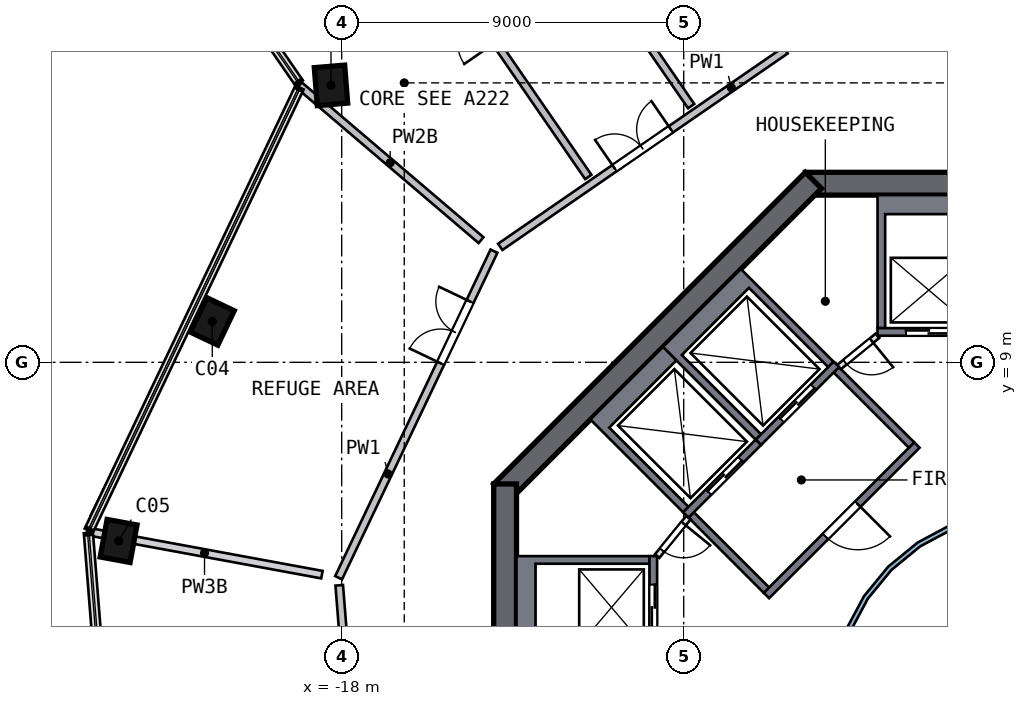
"""IFC4 building model, lengths in metres.
Left out: names, types, materials, properties, quantities, classifications, styles, units other than length and angle.
Written with IfcOpenShell. Run it as: python <this file> out.ifc"""

import sys

from ifc_helpers import new_model, si_unit, direction, frame, frame_2d, origin, origin_2d, place, context, subcontext, project, spatial, polyline, rectangle, outline, extrude, element, fill, save


model = new_model("IFC4")
c1 = context("Model", 3, precision=1e-05, world=origin(), true_north=direction((0.0, 1.0)))
c2 = subcontext(c1, "Body", "Model", "MODEL_VIEW")
j1 = project(units=[si_unit("LENGTHUNIT", "METRE"), si_unit("PLANEANGLEUNIT", "RADIAN")], contexts=[c1])
p1 = place(None, origin())
s1 = spatial("IfcSite", under=j1, at=p1, CompositionType="ELEMENT")
p2 = place(p1, origin())
s2 = spatial("IfcBuilding", under=s1, at=p2, CompositionType="ELEMENT")
p3 = place(p2, frame((0.0, 0.0, 175.0)))
s3 = spatial("IfcBuildingStorey", under=s2, at=p3, CompositionType="ELEMENT", Elevation=175.0)
p4 = place(p3, frame((-18.216, 16.362, 0.0), z_axis=(-0.054164651, -0.061272464, 0.996650328), x_axis=(-0.082257705, 0.994996853, 0.056700377)))
e1 = element("IfcColumn", 1, at=p4, inside=s3, PredefinedType="COLUMN", context=c2, shape_type="SweptSolid", body=[
    extrude(rectangle(XDim=1.0, YDim=0.8, at=origin_2d()), origin(), (0.0, 0.0, 1.0), 4.706),
])
p5 = place(p3, frame((-21.364, 10.163, 0.0), z_axis=(-0.033367399, -0.071664662, 0.9968705), x_axis=(-0.428377245, -0.90013564, -0.079049135)))
e2 = element("IfcColumn", 2, at=p5, inside=s3, PredefinedType="COLUMN", context=c2, shape_type="SweptSolid", body=[
    extrude(rectangle(XDim=1.0, YDim=0.8, at=origin_2d()), origin(), (0.0, 0.0, 1.0), 4.705),
])
p6 = place(p3, frame((-23.853, 4.395, 0.0), z_axis=(-0.014009031, -0.079747708, 0.996716635), x_axis=(0.180722075, 0.980195922, 0.08096596)))
e3 = element("IfcColumn", 3, at=p6, inside=s3, PredefinedType="COLUMN", context=c2, shape_type="SweptSolid", body=[
    extrude(rectangle(XDim=1.0, YDim=0.8, at=origin_2d()), origin(), (0.0, 0.0, 1.0), 4.705),
])
p7 = place(p3, frame((5.799, 13.7, 0.0), z_axis=(0.0, 0.0, 1.0), x_axis=(-1.0, 0.0, 0.0)))
e4 = element("IfcWall", 4, at=p7, inside=s3, PredefinedType="SHEAR", context=c2, shape_type="SweptSolid", body=[
    extrude(rectangle(XDim=11.598, YDim=0.6, at=frame_2d((5.799, 0.0))), origin(), (0.0, 0.0, 1.0), 5.0),
])
p8 = place(p7, frame((4.899, 0.0, 0.0)))
e5 = element("IfcOpeningElement", 5, at=p8, cuts=e4, PredefinedType="OPENING", context=c2, shape_type="SweptSolid", body=[
    extrude(rectangle(XDim=1.8, YDim=2.1, at=frame_2d((0.9, 1.05))), frame((0.0, 0.31, 0.0), z_axis=(0.0, -1.0, 0.0), x_axis=(1.0, 0.0, 0.0)), (0.0, 0.0, 1.0), 0.62),
])
p9 = place(p3, frame((-5.587, 13.788, 0.0), z_axis=(0.0, 0.0, 1.0), x_axis=(-0.707106781, -0.707106781, 0.0)))
e6 = element("IfcWall", 6, at=p9, inside=s3, PredefinedType="SHEAR", context=c2, shape_type="SweptSolid", body=[
    extrude(rectangle(XDim=11.598, YDim=0.6, at=frame_2d((5.799, 0.0))), origin(), (0.0, 0.0, 1.0), 5.0),
])
p10 = place(p3, frame((-13.7, 5.799, 0.0), z_axis=(0.0, 0.0, 1.0), x_axis=(0.0, -1.0, 0.0)))
e7 = element("IfcWall", 7, at=p10, inside=s3, PredefinedType="SHEAR", context=c2, shape_type="SweptSolid", body=[
    extrude(rectangle(XDim=11.598, YDim=0.6, at=frame_2d((5.799, 0.0))), origin(), (0.0, 0.0, 1.0), 5.0),
])
p11 = place(p10, frame((4.899, 0.0, 0.0)))
e8 = element("IfcOpeningElement", 8, at=p11, cuts=e7, PredefinedType="OPENING", context=c2, shape_type="SweptSolid", body=[
    extrude(rectangle(XDim=1.8, YDim=2.1, at=frame_2d((0.9, 1.05))), frame((0.0, 0.31, 0.0), z_axis=(0.0, -1.0, 0.0), x_axis=(1.0, 0.0, 0.0)), (0.0, 0.0, 1.0), 0.62),
])
p12 = place(p3, origin())
e9 = element("IfcWall", 9, at=p12, inside=s3, PredefinedType="SOLIDWALL", context=c2, shape_type="SweptSolid", body=[
    extrude(outline(polyline([(-3.9, 13.4), (-1.2, 13.4), (-1.2, 9.9), (-1.4, 9.9), (-1.4, 12.9), (-3.7, 12.9), (-3.7, 9.9), (-3.9, 9.9), (-3.9, 13.4)])), origin(), (0.0, 0.0, 1.0), 4.69),
])
p13 = place(p3, frame((-1.2, 9.8, 0.0), z_axis=(0.0, 0.0, 1.0), x_axis=(-1.0, 0.0, 0.0)))
e10 = element("IfcWall", 10, at=p13, inside=s3, PredefinedType="SOLIDWALL", context=c2, shape_type="SweptSolid", body=[
    extrude(rectangle(XDim=2.7, YDim=0.2, at=frame_2d((1.35, 0.0))), origin(), (0.0, 0.0, 1.0), 4.69),
])
p14 = place(p13, frame((0.75, 0.0, 0.0)))
e11 = element("IfcOpeningElement", 11, at=p14, cuts=e10, PredefinedType="OPENING", context=c2, shape_type="SweptSolid", body=[
    extrude(rectangle(XDim=1.2, YDim=2.1, at=frame_2d((0.6, 1.05))), frame((0.0, 0.11, 0.0), z_axis=(0.0, -1.0, 0.0), x_axis=(1.0, 0.0, 0.0)), (0.0, 0.0, 1.0), 0.22),
])
p15 = place(p3, origin())
e12 = element("IfcWall", 12, at=p15, inside=s3, PredefinedType="SOLIDWALL", context=c2, shape_type="SweptSolid", body=[
    extrude(outline(polyline([(-13.4, 3.9), (-9.9, 3.9), (-9.9, 3.7), (-12.9, 3.7), (-12.9, 1.4), (-9.9, 1.4), (-9.9, 1.2), (-13.4, 1.2), (-13.4, 3.9)])), origin(), (0.0, 0.0, 1.0), 4.69),
])
p16 = place(p3, frame((-9.8, 1.2, 0.0), z_axis=(0.0, 0.0, 1.0), x_axis=(0.0, 1.0, 0.0)))
e13 = element("IfcWall", 13, at=p16, inside=s3, PredefinedType="SOLIDWALL", context=c2, shape_type="SweptSolid", body=[
    extrude(rectangle(XDim=2.7, YDim=0.2, at=frame_2d((1.35, 0.0))), origin(), (0.0, 0.0, 1.0), 4.69),
])
p17 = place(p16, frame((0.75, 0.0, 0.0)))
e14 = element("IfcOpeningElement", 14, at=p17, cuts=e13, PredefinedType="OPENING", context=c2, shape_type="SweptSolid", body=[
    extrude(rectangle(XDim=1.2, YDim=2.1, at=frame_2d((0.6, 1.05))), frame((0.0, 0.11, 0.0), z_axis=(0.0, -1.0, 0.0), x_axis=(1.0, 0.0, 0.0)), (0.0, 0.0, 1.0), 0.22),
])
p18 = place(p3, origin())
e15 = element("IfcWall", 15, at=p18, inside=s3, PredefinedType="SOLIDWALL", context=c2, shape_type="SweptSolid", body=[
    extrude(outline(polyline([(-9.546, 9.405), (-7.495, 11.455), (-5.056, 9.016), (-5.197, 8.874), (-7.283, 10.96), (-9.051, 9.192), (-6.965, 7.106), (-7.106, 6.965), (-9.546, 9.405)])), origin(), (0.0, 0.0, 1.0), 4.69),
])
p19 = place(p3, frame((-4.985, 8.945, 0.0), z_axis=(0.0, 0.0, 1.0), x_axis=(-0.707106781, -0.707106781, 0.0)))
e16 = element("IfcWall", 16, at=p19, inside=s3, PredefinedType="SOLIDWALL", context=c2, shape_type="SweptSolid", body=[
    extrude(rectangle(XDim=2.9, YDim=0.2, at=frame_2d((1.45, 0.0))), origin(), (0.0, 0.0, 1.0), 4.69),
])
p20 = place(p19, frame((0.85, 0.0, 0.0)))
e17 = element("IfcOpeningElement", 17, at=p20, cuts=e16, PredefinedType="OPENING", context=c2, shape_type="SweptSolid", body=[
    extrude(rectangle(XDim=1.2, YDim=2.1, at=frame_2d((0.6, 1.05))), frame((0.0, 0.11, 0.0), z_axis=(0.0, -1.0, 0.0), x_axis=(1.0, 0.0, 0.0)), (0.0, 0.0, 1.0), 0.22),
])
p21 = place(p3, origin())
e18 = element("IfcWall", 18, at=p21, inside=s3, PredefinedType="SOLIDWALL", context=c2, shape_type="SweptSolid", body=[
    extrude(outline(polyline([(-11.455, 7.495), (-9.546, 9.405), (-9.192, 9.051), (-10.96, 7.283), (-8.874, 5.197), (-9.016, 5.056), (-11.455, 7.495)])), origin(), (0.0, 0.0, 1.0), 4.69),
])
p22 = place(p3, frame((-7.036, 6.894, 0.0), z_axis=(0.0, 0.0, 1.0), x_axis=(-0.707106781, -0.707106781, 0.0)))
e19 = element("IfcWall", 19, at=p22, inside=s3, PredefinedType="SOLIDWALL", context=c2, shape_type="SweptSolid", body=[
    extrude(rectangle(XDim=2.7, YDim=0.2, at=frame_2d((1.35, 0.0))), origin(), (0.0, 0.0, 1.0), 4.69),
])
p23 = place(p22, frame((0.65, 0.0, 0.0)))
e20 = element("IfcOpeningElement", 20, at=p23, cuts=e19, PredefinedType="OPENING", context=c2, shape_type="SweptSolid", body=[
    extrude(rectangle(XDim=1.2, YDim=2.1, at=frame_2d((0.6, 1.05))), frame((0.0, 0.11, 0.0), z_axis=(0.0, -1.0, 0.0), x_axis=(1.0, 0.0, 0.0)), (0.0, 0.0, 1.0), 0.22),
])
p24 = place(p3, frame((-2.864, 6.823, 0.0), z_axis=(0.0, 0.0, 1.0), x_axis=(-0.707106781, -0.707106781, 0.0)))
e21 = element("IfcWall", 21, at=p24, inside=s3, PredefinedType="SOLIDWALL", context=c2, shape_type="SweptSolid", body=[
    extrude(rectangle(XDim=5.6, YDim=0.2, at=frame_2d((2.8, 0.0))), origin(), (0.0, 0.0, 1.0), 4.69),
])
p25 = place(p24, frame((2.2, 0.0, 0.0)))
e22 = element("IfcOpeningElement", 22, at=p25, cuts=e21, PredefinedType="OPENING", context=c2, shape_type="SweptSolid", body=[
    extrude(rectangle(XDim=1.2, YDim=2.1, at=frame_2d((0.6, 1.05))), frame((0.0, 0.11, 0.0), z_axis=(0.0, -1.0, 0.0), x_axis=(1.0, 0.0, 0.0)), (0.0, 0.0, 1.0), 0.22),
])
for number, where, z_axis, x_axis in (
    (23, (-3.005, 6.823, 0.0), (0.0, 0.0, 1.0), (-0.707, 0.707, 0.0)),
    (24, (-6.823, 3.005, 0.0), (0.0, 0.0, 1.0), (-0.707, 0.707, 0.0)),
):
    element("IfcWall", number, at=place(p3, frame(where, z_axis=z_axis, x_axis=x_axis)), inside=s3, PredefinedType="SOLIDWALL", context=c2, shape_type="SweptSolid", body=[
        extrude(rectangle(XDim=2.8, YDim=0.2, at=frame_2d((1.4, 0.0))), origin(), (0.0, 0.0, 1.0), 4.69),
    ])
p26 = place(p3, frame((-3.9, 9.7, 0.0), z_axis=(0.0, 0.0, 1.0), x_axis=(-0.775559878, -0.631274009, 0.0)))
e25 = element("IfcWall", 25, at=p26, inside=s3, PredefinedType="PARTITIONING", context=c2, shape_type="SweptSolid", body=[
    extrude(rectangle(XDim=1.308, YDim=0.15, at=frame_2d((0.654, 0.0))), origin(), (0.0, 0.0, 1.0), 4.69),
])
p27 = place(p26, frame((0.204, 0.0, 0.0)))
e26 = element("IfcOpeningElement", 26, at=p27, cuts=e25, PredefinedType="OPENING", context=c2, shape_type="SweptSolid", body=[
    extrude(rectangle(XDim=0.9, YDim=2.1, at=frame_2d((0.45, 1.05))), frame((0.0, 0.085, 0.0), z_axis=(0.0, -1.0, 0.0), x_axis=(1.0, 0.0, 0.0)), (0.0, 0.0, 1.0), 0.17),
])
p28 = place(p3, frame((-8.874, 4.914, 0.0), z_axis=(0.0, 0.0, 1.0), x_axis=(-0.631274009, -0.775559878, 0.0)))
e27 = element("IfcWall", 27, at=p28, inside=s3, PredefinedType="PARTITIONING", context=c2, shape_type="SweptSolid", body=[
    extrude(rectangle(XDim=1.308, YDim=0.15, at=frame_2d((0.654, 0.0))), origin(), (0.0, 0.0, 1.0), 4.69),
])
p29 = place(p28, frame((0.204, 0.0, 0.0)))
e28 = element("IfcOpeningElement", 28, at=p29, cuts=e27, PredefinedType="OPENING", context=c2, shape_type="SweptSolid", body=[
    extrude(rectangle(XDim=0.9, YDim=2.1, at=frame_2d((0.45, 1.05))), frame((0.0, 0.085, 0.0), z_axis=(0.0, -1.0, 0.0), x_axis=(1.0, 0.0, 0.0)), (0.0, 0.0, 1.0), 0.17),
])
p30 = place(p3, origin())
e29 = element("IfcWall", 29, at=p30, inside=s3, PredefinedType="SOLIDWALL", context=c2, shape_type="SweptSolid", body=[
    extrude(outline(polyline([(5.021, -0.999), (4.73, -1.959), (4.257, -2.844), (3.62, -3.62), (2.844, -4.257), (1.959, -4.73), (0.999, -5.021), (0.0, -5.12), (-0.999, -5.021), (-1.959, -4.73), (-2.844, -4.257), (-3.62, -3.62), (-4.257, -2.844), (-4.73, -1.959), (-5.021, -0.999), (-5.12, 0.0), (-5.021, 0.999), (-4.73, 1.959), (-4.257, 2.844), (-3.62, 3.62), (-2.844, 4.257), (-1.959, 4.73), (-0.999, 5.021), (0.0, 5.12), (0.999, 5.021), (1.959, 4.73), (2.844, 4.257), (3.62, 3.62), (4.257, 2.844), (4.73, 1.959), (5.021, 0.999), (5.12, 0.0), (5.021, -0.999)]), holes=[polyline([(4.904, 0.976), (4.619, 1.913), (4.157, 2.778), (3.535, 3.535), (2.778, 4.157), (1.913, 4.619), (0.976, 4.904), (0.0, 5.0), (-0.976, 4.904), (-1.913, 4.619), (-2.778, 4.157), (-3.535, 3.535), (-4.157, 2.778), (-4.619, 1.913), (-4.904, 0.976), (-5.0, 0.0), (-4.904, -0.976), (-4.619, -1.913), (-4.157, -2.778), (-3.535, -3.535), (-2.778, -4.157), (-1.913, -4.619), (-0.976, -4.904), (0.0, -5.0), (0.976, -4.904), (1.913, -4.619), (2.778, -4.157), (3.535, -3.535), (4.157, -2.778), (4.619, -1.913), (4.904, -0.976), (5.0, 0.0), (4.904, 0.976)])]), origin(), (0.0, 0.0, 1.0), 4.69),
])
p31 = place(p3, frame((-17.34, -5.956, 0.0), z_axis=(0.0, 0.0, 1.0), x_axis=(-0.079507867, 0.996834238, 0.0)))
e30 = element("IfcWall", 30, at=p31, inside=s3, PredefinedType="SOLIDWALL", context=c2, shape_type="SweptSolid", body=[
    extrude(rectangle(XDim=9.117, YDim=0.2, at=frame_2d((4.558, 0.0))), origin(), (0.0, 0.0, 1.0), 4.69),
])
p32 = place(p31, frame((6.508, 0.0, 0.0)))
e31 = element("IfcOpeningElement", 31, at=p32, cuts=e30, PredefinedType="OPENING", context=c2, shape_type="SweptSolid", body=[
    extrude(rectangle(XDim=0.9, YDim=2.1, at=frame_2d((0.45, 1.05))), frame((0.0, 0.11, 0.0), z_axis=(0.0, -1.0, 0.0), x_axis=(1.0, 0.0, 0.0)), (0.0, 0.0, 1.0), 0.22),
])
p33 = place(p31, frame((2.458, 0.0, 0.0)))
e32 = element("IfcOpeningElement", 32, at=p33, cuts=e30, PredefinedType="OPENING", context=c2, shape_type="SweptSolid", body=[
    extrude(rectangle(XDim=0.9, YDim=2.1, at=frame_2d((0.45, 1.05))), frame((0.0, 0.11, 0.0), z_axis=(0.0, -1.0, 0.0), x_axis=(1.0, 0.0, 0.0)), (0.0, 0.0, 1.0), 0.22),
])
p34 = place(p31, frame((0.2, 0.0, 0.0)))
e33 = element("IfcOpeningElement", 33, at=p34, cuts=e30, PredefinedType="OPENING", context=c2, shape_type="SweptSolid", body=[
    extrude(rectangle(XDim=0.9, YDim=2.1, at=frame_2d((0.45, 1.05))), frame((0.0, 0.11, 0.0), z_axis=(0.0, -1.0, 0.0), x_axis=(1.0, 0.0, 0.0)), (0.0, 0.0, 1.0), 0.22),
])
p35 = place(p3, frame((-18.08, 3.332, 0.0), z_axis=(0.0, 0.0, 1.0), x_axis=(0.429559111, 0.903038742, 0.0)))
e34 = element("IfcWall", 34, at=p35, inside=s3, PredefinedType="SOLIDWALL", context=c2, shape_type="SweptSolid", body=[
    extrude(rectangle(XDim=9.517, YDim=0.2, at=frame_2d((4.758, 0.0))), origin(), (0.0, 0.0, 1.0), 4.69),
])
p36 = place(p35, frame((6.25, 0.0, 0.0)))
e35 = element("IfcOpeningElement", 35, at=p36, cuts=e34, PredefinedType="OPENING", context=c2, shape_type="SweptSolid", body=[
    extrude(rectangle(XDim=1.8, YDim=2.1, at=frame_2d((0.9, 1.05))), frame((0.0, 0.11, 0.0), z_axis=(0.0, -1.0, 0.0), x_axis=(1.0, 0.0, 0.0)), (0.0, 0.0, 1.0), 0.22),
])
p37 = place(p3, frame((-13.828, 12.039, 0.0), z_axis=(0.0, 0.0, 1.0), x_axis=(0.823529008, 0.56727416, 0.0)))
e36 = element("IfcWall", 36, at=p37, inside=s3, PredefinedType="SOLIDWALL", context=c2, shape_type="SweptSolid", body=[
    extrude(rectangle(XDim=9.117, YDim=0.2, at=frame_2d((4.558, 0.0))), origin(), (0.0, 0.0, 1.0), 4.69),
])
p38 = place(p37, frame((3.651, 0.0, 0.0)))
e37 = element("IfcOpeningElement", 37, at=p38, cuts=e36, PredefinedType="OPENING", context=c2, shape_type="SweptSolid", body=[
    extrude(rectangle(XDim=1.8, YDim=2.1, at=frame_2d((0.9, 1.05))), frame((0.0, 0.11, 0.0), z_axis=(0.0, -1.0, 0.0), x_axis=(1.0, 0.0, 0.0)), (0.0, 0.0, 1.0), 0.22),
])
p39 = place(p3, frame((-14.333, 12.215, 0.0), z_axis=(0.0, 0.0, 1.0), x_axis=(-0.76108334, 0.648654107, 0.0)))
e38 = element("IfcWall", 38, at=p39, inside=s3, PredefinedType="SOLIDWALL", context=c2, shape_type="SweptSolid", body=[
    extrude(rectangle(XDim=6.282, YDim=0.2, at=frame_2d((3.141, 0.0))), origin(), (0.0, 0.0, 1.0), 4.19),
])
p40 = place(p3, frame((-11.51, 13.878, 0.0), z_axis=(0.0, 0.0, 1.0), x_axis=(-0.567267242, 0.823533774, 0.0)))
e39 = element("IfcWall", 39, at=p40, inside=s3, PredefinedType="SOLIDWALL", context=c2, shape_type="SweptSolid", body=[
    extrude(rectangle(XDim=14.042, YDim=0.2, at=frame_2d((7.021, 0.0))), origin(), (0.0, 0.0, 1.0), 4.69),
])
p41 = place(p40, frame((4.3, 0.0, 0.0)))
e40 = element("IfcOpeningElement", 40, at=p41, cuts=e39, PredefinedType="OPENING", context=c2, shape_type="SweptSolid", body=[
    extrude(rectangle(XDim=1.0, YDim=2.1, at=frame_2d((0.5, 1.05))), frame((0.0, 0.11, 0.0), z_axis=(0.0, -1.0, 0.0), x_axis=(1.0, 0.0, 0.0)), (0.0, 0.0, 1.0), 0.22),
])
p42 = place(p3, frame((-16.769, 27.306, 0.0), z_axis=(0.0, 0.0, 1.0), x_axis=(0.567279033, -0.823525651, 0.0)))
e41 = element("IfcWall", 41, at=p42, inside=s3, PredefinedType="SOLIDWALL", context=c2, shape_type="SweptSolid", body=[
    extrude(rectangle(XDim=14.042, YDim=0.2, at=frame_2d((7.021, 0.0))), origin(), (0.0, 0.0, 1.0), 4.69),
])
p43 = place(p42, frame((4.5, 0.0, 0.0)))
e42 = element("IfcOpeningElement", 42, at=p43, cuts=e41, PredefinedType="OPENING", context=c2, shape_type="SweptSolid", body=[
    extrude(rectangle(XDim=1.0, YDim=2.1, at=frame_2d((0.5, 1.05))), frame((0.0, 0.11, 0.0), z_axis=(0.0, -1.0, 0.0), x_axis=(1.0, 0.0, 0.0)), (0.0, 0.0, 1.0), 0.22),
])
p44 = place(p3, frame((-18.52, 3.413, 0.0), z_axis=(0.0, 0.0, 1.0), x_axis=(-0.983449362, 0.181183202, 0.0)))
e43 = element("IfcWall", 43, at=p44, inside=s3, PredefinedType="SOLIDWALL", context=c2, shape_type="SweptSolid", body=[
    extrude(rectangle(XDim=6.282, YDim=0.2, at=frame_2d((3.141, 0.0))), origin(), (0.0, 0.0, 1.0), 4.19),
])
p45 = place(p14, origin())
e44 = element("IfcDoor", 44, at=p45, inside=s3, OperationType="DOUBLE_DOOR_SLIDING", PredefinedType="DOOR", context=c2, shape_type="SweptSolid", body=[
    extrude(rectangle(XDim=1.2, YDim=2.1, at=frame_2d((0.6, 1.05))), frame((0.0, 0.025, 0.0), z_axis=(0.0, -1.0, 0.0), x_axis=(1.0, 0.0, 0.0)), (0.0, 0.0, 1.0), 0.05),
])
fill(e11, e44)
p46 = place(p17, origin())
e45 = element("IfcDoor", 45, at=p46, inside=s3, OperationType="DOUBLE_DOOR_SLIDING", PredefinedType="DOOR", context=c2, shape_type="SweptSolid", body=[
    extrude(rectangle(XDim=1.2, YDim=2.1, at=frame_2d((0.6, 1.05))), frame((0.0, 0.025, 0.0), z_axis=(0.0, -1.0, 0.0), x_axis=(1.0, 0.0, 0.0)), (0.0, 0.0, 1.0), 0.05),
])
fill(e14, e45)
p47 = place(p20, origin())
e46 = element("IfcDoor", 46, at=p47, inside=s3, OperationType="DOUBLE_DOOR_SLIDING", PredefinedType="DOOR", context=c2, shape_type="SweptSolid", body=[
    extrude(rectangle(XDim=1.2, YDim=2.1, at=frame_2d((0.6, 1.05))), frame((0.0, 0.025, 0.0), z_axis=(0.0, -1.0, 0.0), x_axis=(1.0, 0.0, 0.0)), (0.0, 0.0, 1.0), 0.05),
])
fill(e17, e46)
p48 = place(p23, origin())
e47 = element("IfcDoor", 47, at=p48, inside=s3, OperationType="DOUBLE_DOOR_SLIDING", PredefinedType="DOOR", context=c2, shape_type="SweptSolid", body=[
    extrude(rectangle(XDim=1.2, YDim=2.1, at=frame_2d((0.6, 1.05))), frame((0.0, 0.025, 0.0), z_axis=(0.0, -1.0, 0.0), x_axis=(1.0, 0.0, 0.0)), (0.0, 0.0, 1.0), 0.05),
])
fill(e20, e47)
p49 = place(p25, origin())
e48 = element("IfcDoor", 48, at=p49, inside=s3, OperationType="SINGLE_SWING_LEFT", PredefinedType="DOOR", context=c2, shape_type="SweptSolid", body=[
    extrude(rectangle(XDim=1.2, YDim=2.1, at=frame_2d((0.6, 1.05))), frame((0.0, 0.025, 0.0), z_axis=(0.0, -1.0, 0.0), x_axis=(1.0, 0.0, 0.0)), (0.0, 0.0, 1.0), 0.05),
])
fill(e22, e48)
p50 = place(p27, origin())
e49 = element("IfcDoor", 49, at=p50, inside=s3, OperationType="SINGLE_SWING_LEFT", PredefinedType="DOOR", context=c2, shape_type="SweptSolid", body=[
    extrude(rectangle(XDim=0.9, YDim=2.1, at=frame_2d((0.45, 1.05))), frame((0.0, 0.025, 0.0), z_axis=(0.0, -1.0, 0.0), x_axis=(1.0, 0.0, 0.0)), (0.0, 0.0, 1.0), 0.05),
])
fill(e26, e49)
p51 = place(p29, origin())
e50 = element("IfcDoor", 50, at=p51, inside=s3, OperationType="SINGLE_SWING_LEFT", PredefinedType="DOOR", context=c2, shape_type="SweptSolid", body=[
    extrude(rectangle(XDim=0.9, YDim=2.1, at=frame_2d((0.45, 1.05))), frame((0.0, 0.025, 0.0), z_axis=(0.0, -1.0, 0.0), x_axis=(1.0, 0.0, 0.0)), (0.0, 0.0, 1.0), 0.05),
])
fill(e28, e50)
p52 = place(p38, origin())
e51 = element("IfcDoor", 51, at=p52, inside=s3, OperationType="DOUBLE_DOOR_SINGLE_SWING", PredefinedType="DOOR", context=c2, shape_type="SweptSolid", body=[
    extrude(rectangle(XDim=1.8, YDim=2.1, at=frame_2d((0.9, 1.05))), frame((0.0, 0.025, 0.0), z_axis=(0.0, -1.0, 0.0), x_axis=(1.0, 0.0, 0.0)), (0.0, 0.0, 1.0), 0.05),
])
fill(e37, e51)
p53 = place(p36, origin())
e52 = element("IfcDoor", 52, at=p53, inside=s3, OperationType="DOUBLE_DOOR_SINGLE_SWING", PredefinedType="DOOR", context=c2, shape_type="SweptSolid", body=[
    extrude(rectangle(XDim=1.8, YDim=2.1, at=frame_2d((0.9, 1.05))), frame((0.0, 0.025, 0.0), z_axis=(0.0, -1.0, 0.0), x_axis=(1.0, 0.0, 0.0)), (0.0, 0.0, 1.0), 0.05),
])
fill(e35, e52)
save(model, sys.argv[1])
